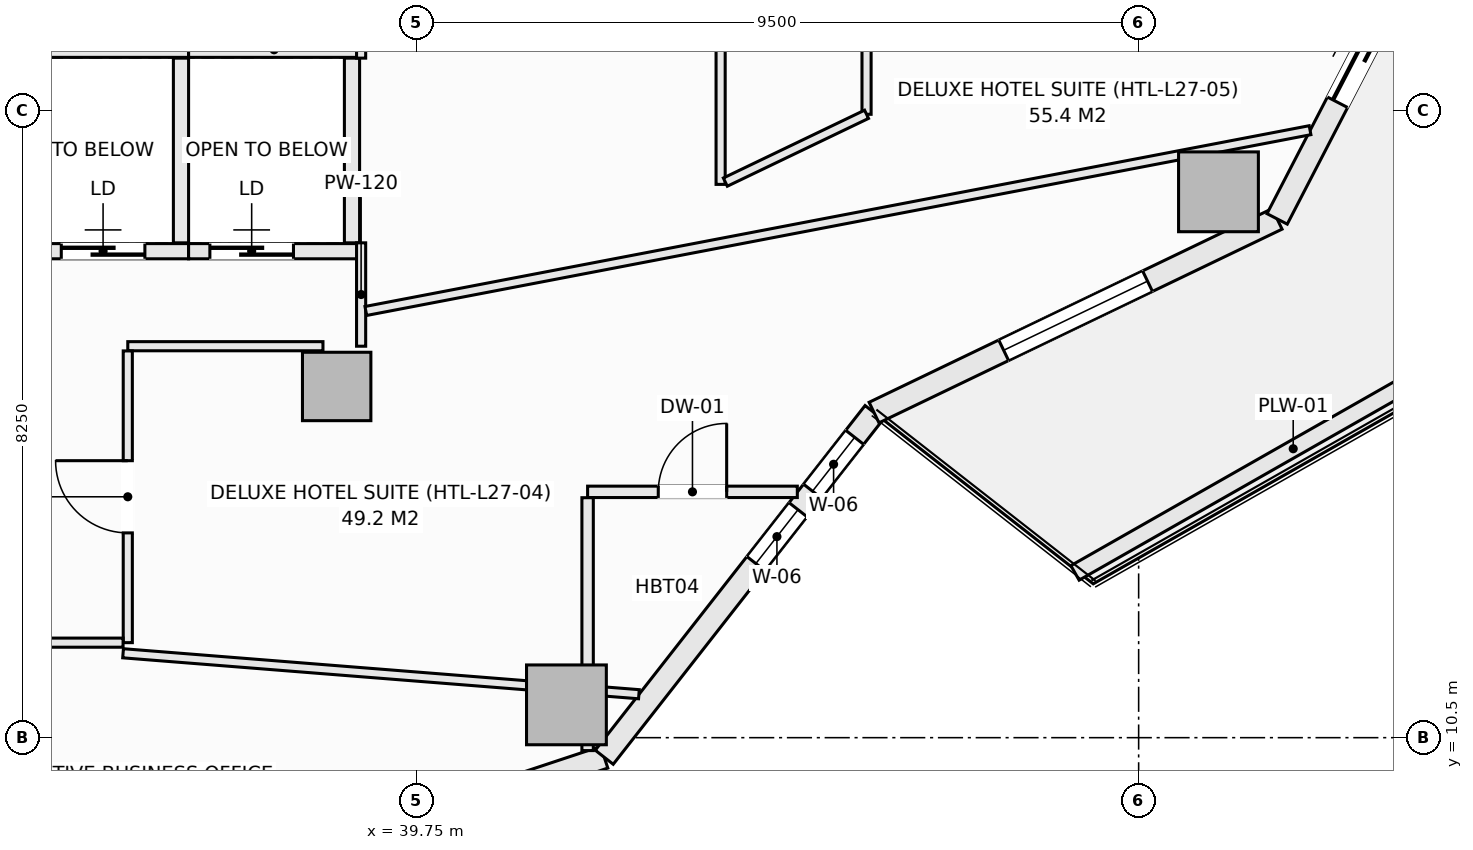
"""IFC4 building model, lengths in metres.
Left out: names, types, materials, properties, quantities, classifications, styles, units other than length and angle.
Written with IfcOpenShell. Run it as: python <this file> out.ifc"""

import sys

from ifc_helpers import new_model, si_unit, direction, frame, frame_2d, origin, origin_2d, place, context, subcontext, project, spatial, rectangle, extrude, element, fill, save


model = new_model("IFC4")
c1 = context("Model", 3, precision=1e-05, world=origin(), true_north=direction((0.0, 1.0)))
c2 = subcontext(c1, "Body", "Model", "MODEL_VIEW")
j1 = project(units=[si_unit("LENGTHUNIT", "METRE"), si_unit("PLANEANGLEUNIT", "RADIAN")], contexts=[c1])
p1 = place(None, origin())
s1 = spatial("IfcSite", under=j1, at=p1, CompositionType="ELEMENT")
p2 = place(p1, origin())
s2 = spatial("IfcBuilding", under=s1, at=p2, CompositionType="ELEMENT")
p3 = place(p2, frame((0.0, 0.0, 112.1)))
s3 = spatial("IfcBuildingStorey", under=s2, at=p3, CompositionType="ELEMENT", Elevation=112.1)
for number, where, z_axis, x_axis in (
    (1, (41.721, 10.932, -0.27), (0.0, 0.0, 1.0), (1.0, 0.0, 0.0)),
    (2, (50.3, 17.681, -0.27), (0.0, 0.0, 1.0), (1.0, 0.0, 0.0)),
):
    element("IfcColumn", number, at=place(p3, frame(where, z_axis=z_axis, x_axis=x_axis)), inside=s3, PredefinedType="COLUMN", context=c2, shape_type="SweptSolid", body=[
        extrude(rectangle(XDim=1.05, YDim=1.05, at=origin_2d()), origin(), (0.0, 0.0, 1.0), 3.4),
    ])
p4 = place(p3, frame((38.698, 15.121, -0.27), z_axis=(0.0, 0.0, 1.0), x_axis=(1.0, 0.0, 0.0)))
e3 = element("IfcColumn", 3, at=p4, inside=s3, PredefinedType="COLUMN", context=c2, shape_type="SweptSolid", body=[
    extrude(rectangle(XDim=0.9, YDim=0.9, at=origin_2d()), origin(), (0.0, 0.0, 1.0), 3.4),
])
p5 = place(p3, frame((36.385, 8.309, 0.0), z_axis=(0.0, 0.0, 1.0), x_axis=(0.949238009374, 0.314558741032, 0.0)))
e4 = element("IfcWall", 4, at=p5, inside=s3, PredefinedType="SOLIDWALL", context=c2, shape_type="SweptSolid", body=[
    extrude(rectangle(XDim=6.146, YDim=0.3, at=frame_2d((3.073, 0.0))), origin(), (0.0, 0.0, 1.0), 2.653),
])
p6 = place(p5, frame((2.023, 0.0, 0.74)))
e5 = element("IfcOpeningElement", 5, at=p6, cuts=e4, PredefinedType="OPENING", context=c2, shape_type="SweptSolid", body=[
    extrude(rectangle(XDim=2.1, YDim=1.7, at=frame_2d((1.05, 0.85))), frame((0.0, 0.16, 0.0), z_axis=(0.0, -1.0, 0.0), x_axis=(1.0, 0.0, 0.0)), (0.0, 0.0, 1.0), 0.32),
])
p7 = place(p3, frame((42.219, 10.242, 0.0), z_axis=(0.0, 0.0, 1.0), x_axis=(0.616435134162, 0.787405693001, 0.0)))
e6 = element("IfcWall", 6, at=p7, inside=s3, PredefinedType="SOLIDWALL", context=c2, shape_type="SweptSolid", body=[
    extrude(rectangle(XDim=5.759, YDim=0.3, at=frame_2d((2.879, 0.0))), origin(), (0.0, 0.0, 1.0), 2.653),
])
p8 = place(p7, frame((3.236, 0.0, 0.74)))
e7 = element("IfcOpeningElement", 7, at=p8, cuts=e6, PredefinedType="OPENING", context=c2, shape_type="SweptSolid", body=[
    extrude(rectangle(XDim=0.9, YDim=1.7, at=frame_2d((0.45, 0.85))), frame((0.0, 0.16, 0.0), z_axis=(0.0, -1.0, 0.0), x_axis=(1.0, 0.0, 0.0)), (0.0, 0.0, 1.0), 0.32),
])
p9 = place(p7, frame((4.445, 0.0, 0.74)))
e8 = element("IfcOpeningElement", 8, at=p9, cuts=e6, PredefinedType="OPENING", context=c2, shape_type="SweptSolid", body=[
    extrude(rectangle(XDim=0.9, YDim=1.7, at=frame_2d((0.45, 0.85))), frame((0.0, 0.16, 0.0), z_axis=(0.0, -1.0, 0.0), x_axis=(1.0, 0.0, 0.0)), (0.0, 0.0, 1.0), 0.32),
])
p10 = place(p3, frame((45.769, 14.777, 0.0), z_axis=(0.0, 0.0, 1.0), x_axis=(0.901370184739, 0.433049408339, 0.0)))
e9 = element("IfcWall", 9, at=p10, inside=s3, PredefinedType="SOLIDWALL", context=c2, shape_type="SweptSolid", body=[
    extrude(rectangle(XDim=5.884, YDim=0.3, at=frame_2d((2.942, 0.0))), origin(), (0.0, 0.0, 1.0), 2.653),
])
p11 = place(p10, frame((1.892, 0.0, 0.74)))
e10 = element("IfcOpeningElement", 10, at=p11, cuts=e9, PredefinedType="OPENING", context=c2, shape_type="SweptSolid", body=[
    extrude(rectangle(XDim=2.1, YDim=1.7, at=frame_2d((1.05, 0.85))), frame((0.0, 0.16, 0.0), z_axis=(0.0, -1.0, 0.0), x_axis=(1.0, 0.0, 0.0)), (0.0, 0.0, 1.0), 0.32),
])
p12 = place(p3, frame((51.072, 17.325, 0.0), z_axis=(0.0, 0.0, 1.0), x_axis=(0.459767899643, 0.888039119892, 0.0)))
e11 = element("IfcWall", 11, at=p12, inside=s3, PredefinedType="SOLIDWALL", context=c2, shape_type="SweptSolid", body=[
    extrude(rectangle(XDim=5.255, YDim=0.3, at=frame_2d((2.628, 0.0))), origin(), (0.0, 0.0, 1.0), 2.653),
])
p13 = place(p12, frame((1.728, 0.0, 0.0)))
e12 = element("IfcOpeningElement", 12, at=p13, cuts=e11, PredefinedType="OPENING", context=c2, shape_type="SweptSolid", body=[
    extrude(rectangle(XDim=1.8, YDim=2.25, at=frame_2d((0.9, 1.125))), frame((0.0, 0.16, 0.0), z_axis=(0.0, -1.0, 0.0), x_axis=(1.0, 0.0, 0.0)), (0.0, 0.0, 1.0), 0.32),
])
p14 = place(p3, frame((48.413, 12.668, 0.0), z_axis=(0.0, 0.0, 1.0), x_axis=(0.869187658335, 0.494482370361, 0.0)))
e13 = element("IfcWall", 13, at=p14, inside=s3, PredefinedType="PARAPET", context=c2, shape_type="SweptSolid", body=[
    extrude(rectangle(XDim=6.606, YDim=0.22, at=frame_2d((3.303, 0.0))), origin(), (0.0, 0.0, 1.0), 0.52),
])
p15 = place(p3, frame((34.5, 19.55, 0.0), z_axis=(0.0, 0.0, 1.0), x_axis=(1.0, 0.0, 0.0)))
e14 = element("IfcWall", 14, at=p15, inside=s3, PredefinedType="SOLIDWALL", context=c2, shape_type="SweptSolid", body=[
    extrude(rectangle(XDim=2.25, YDim=0.2, at=frame_2d((1.125, 0.0))), origin(), (0.0, 0.0, 1.0), 3.13),
])
p16 = place(p3, frame((34.5, 16.9, 0.0), z_axis=(0.0, 0.0, 1.0), x_axis=(1.0, 0.0, 0.0)))
e15 = element("IfcWall", 15, at=p16, inside=s3, PredefinedType="SOLIDWALL", context=c2, shape_type="SweptSolid", body=[
    extrude(rectangle(XDim=2.25, YDim=0.2, at=frame_2d((1.125, 0.0))), origin(), (0.0, 0.0, 1.0), 3.13),
])
p17 = place(p16, frame((0.575, 0.0, 0.0)))
e16 = element("IfcOpeningElement", 16, at=p17, cuts=e15, PredefinedType="OPENING", context=c2, shape_type="SweptSolid", body=[
    extrude(rectangle(XDim=1.1, YDim=2.2, at=frame_2d((0.55, 1.1))), frame((0.0, 0.11, 0.0), z_axis=(0.0, -1.0, 0.0), x_axis=(1.0, 0.0, 0.0)), (0.0, 0.0, 1.0), 0.22),
])
p18 = place(p3, frame((36.65, 17.01, 0.0), z_axis=(0.0, 0.0, 1.0), x_axis=(0.0, 1.0, 0.0)))
e17 = element("IfcWall", 17, at=p18, inside=s3, PredefinedType="SOLIDWALL", context=c2, shape_type="SweptSolid", body=[
    extrude(rectangle(XDim=2.43, YDim=0.2, at=frame_2d((1.215, 0.0))), origin(), (0.0, 0.0, 1.0), 3.13),
])
p19 = place(p3, frame((36.75, 19.55, 0.0), z_axis=(0.0, 0.0, 1.0), x_axis=(1.0, 0.0, 0.0)))
e18 = element("IfcWall", 18, at=p19, inside=s3, PredefinedType="SOLIDWALL", context=c2, shape_type="SweptSolid", body=[
    extrude(rectangle(XDim=2.25, YDim=0.2, at=frame_2d((1.125, 0.0))), origin(), (0.0, 0.0, 1.0), 3.13),
])
p20 = place(p3, frame((36.75, 16.9, 0.0), z_axis=(0.0, 0.0, 1.0), x_axis=(1.0, 0.0, 0.0)))
e19 = element("IfcWall", 19, at=p20, inside=s3, PredefinedType="SOLIDWALL", context=c2, shape_type="SweptSolid", body=[
    extrude(rectangle(XDim=2.25, YDim=0.2, at=frame_2d((1.125, 0.0))), origin(), (0.0, 0.0, 1.0), 3.13),
])
p21 = place(p20, frame((0.28, 0.0, 0.0)))
e20 = element("IfcOpeningElement", 20, at=p21, cuts=e19, PredefinedType="OPENING", context=c2, shape_type="SweptSolid", body=[
    extrude(rectangle(XDim=1.1, YDim=2.2, at=frame_2d((0.55, 1.1))), frame((0.0, 0.11, 0.0), z_axis=(0.0, -1.0, 0.0), x_axis=(1.0, 0.0, 0.0)), (0.0, 0.0, 1.0), 0.22),
])
p22 = place(p3, frame((38.9, 17.01, 0.0), z_axis=(0.0, 0.0, 1.0), x_axis=(0.0, 1.0, 0.0)))
e21 = element("IfcWall", 21, at=p22, inside=s3, PredefinedType="SOLIDWALL", context=c2, shape_type="SweptSolid", body=[
    extrude(rectangle(XDim=2.43, YDim=0.2, at=frame_2d((1.215, 0.0))), origin(), (0.0, 0.0, 1.0), 3.13),
])
p23 = place(p3, frame((39.02, 15.65, 0.0), z_axis=(0.0, 0.0, 1.0), x_axis=(0.0, 1.0, 0.0)))
e22 = element("IfcWall", 22, at=p23, inside=s3, PredefinedType="PARTITIONING", context=c2, shape_type="SweptSolid", body=[
    extrude(rectangle(XDim=1.36, YDim=0.12, at=frame_2d((0.68, 0.0))), origin(), (0.0, 0.0, 1.0), 2.505),
])
p24 = place(p3, frame((39.02, 19.44, 0.0), z_axis=(0.0, 0.0, 1.0), x_axis=(0.0, 1.0, 0.0)))
e23 = element("IfcWall", 23, at=p24, inside=s3, PredefinedType="PARTITIONING", context=c2, shape_type="SweptSolid", body=[
    extrude(rectangle(XDim=0.92, YDim=0.12, at=frame_2d((0.46, 0.0))), origin(), (0.0, 0.0, 1.0), 3.13),
])
p25 = place(p3, frame((35.95, 15.65, 0.0), z_axis=(0.0, 0.0, 1.0), x_axis=(1.0, 0.0, 0.0)))
e24 = element("IfcWall", 24, at=p25, inside=s3, PredefinedType="PARTITIONING", context=c2, shape_type="SweptSolid", body=[
    extrude(rectangle(XDim=2.568, YDim=0.12, at=frame_2d((1.284, 0.0))), origin(), (0.0, 0.0, 1.0), 3.13),
])
p26 = place(p3, frame((35.95, 11.75, 0.0), z_axis=(0.0, 0.0, 1.0), x_axis=(0.0, 1.0, 0.0)))
e25 = element("IfcWall", 25, at=p26, inside=s3, PredefinedType="PARTITIONING", context=c2, shape_type="SweptSolid", body=[
    extrude(rectangle(XDim=3.838, YDim=0.12, at=frame_2d((1.919, 0.0))), origin(), (0.0, 0.0, 1.0), 3.13),
])
p27 = place(p26, frame((1.444, 0.0, 0.0)))
e26 = element("IfcOpeningElement", 26, at=p27, cuts=e25, PredefinedType="OPENING", context=c2, shape_type="SweptSolid", body=[
    extrude(rectangle(XDim=0.95, YDim=2.1, at=frame_2d((0.475, 1.05))), frame((0.0, 0.07, 0.0), z_axis=(0.0, -1.0, 0.0), x_axis=(1.0, 0.0, 0.0)), (0.0, 0.0, 1.0), 0.14),
])
p28 = place(p3, frame((27.242, 11.75, 0.0), z_axis=(0.0, 0.0, 1.0), x_axis=(1.0, 0.0, 0.0)))
e27 = element("IfcWall", 27, at=p28, inside=s3, PredefinedType="PARTITIONING", context=c2, shape_type="SweptSolid", body=[
    extrude(rectangle(XDim=8.646, YDim=0.12, at=frame_2d((4.323, 0.0))), origin(), (0.0, 0.0, 1.0), 3.13),
])
p29 = place(p28, frame((1.586, 0.0, 0.0)))
e28 = element("IfcOpeningElement", 28, at=p29, cuts=e27, PredefinedType="OPENING", context=c2, shape_type="SweptSolid", body=[
    extrude(rectangle(XDim=0.95, YDim=2.1, at=frame_2d((0.475, 1.05))), frame((0.0, 0.07, 0.0), z_axis=(0.0, -1.0, 0.0), x_axis=(1.0, 0.0, 0.0)), (0.0, 0.0, 1.0), 0.14),
])
p30 = place(p28, frame((5.485, 0.0, 0.0)))
e29 = element("IfcOpeningElement", 29, at=p30, cuts=e27, PredefinedType="OPENING", context=c2, shape_type="SweptSolid", body=[
    extrude(rectangle(XDim=0.95, YDim=2.1, at=frame_2d((0.475, 1.05))), frame((0.0, 0.07, 0.0), z_axis=(0.0, -1.0, 0.0), x_axis=(1.0, 0.0, 0.0)), (0.0, 0.0, 1.0), 0.14),
])
p31 = place(p3, frame((43.75, 17.779, 0.0), z_axis=(0.0, 0.0, 1.0), x_axis=(0.0, 1.0, 0.0)))
e30 = element("IfcWall", 30, at=p31, inside=s3, PredefinedType="PARTITIONING", context=c2, shape_type="SweptSolid", body=[
    extrude(rectangle(XDim=5.241, YDim=0.12, at=frame_2d((2.621, 0.0))), origin(), (0.0, 0.0, 1.0), 3.13),
])
p32 = place(p31, frame((2.146, 0.0, 0.0)))
e31 = element("IfcOpeningElement", 31, at=p32, cuts=e30, PredefinedType="OPENING", context=c2, shape_type="SweptSolid", body=[
    extrude(rectangle(XDim=0.95, YDim=2.1, at=frame_2d((0.475, 1.05))), frame((0.0, 0.07, 0.0), z_axis=(0.0, -1.0, 0.0), x_axis=(1.0, 0.0, 0.0)), (0.0, 0.0, 1.0), 0.14),
])
p33 = place(p3, frame((45.67, 18.701, 0.0), z_axis=(0.0, 0.0, 1.0), x_axis=(0.0, 1.0, 0.0)))
e32 = element("IfcWall", 32, at=p33, inside=s3, PredefinedType="PARTITIONING", context=c2, shape_type="SweptSolid", body=[
    extrude(rectangle(XDim=8.747, YDim=0.12, at=frame_2d((4.374, 0.0))), origin(), (0.0, 0.0, 1.0), 3.13),
])
p34 = place(p3, frame((43.812, 17.809, 0.0), z_axis=(0.0, 0.0, 1.0), x_axis=(0.901467594949, 0.432846595525, 0.0)))
e33 = element("IfcWall", 33, at=p34, inside=s3, PredefinedType="PARTITIONING", context=c2, shape_type="SweptSolid", body=[
    extrude(rectangle(XDim=2.061, YDim=0.12, at=frame_2d((1.031, 0.0))), origin(), (0.0, 0.0, 1.0), 3.13),
])
p35 = place(p3, frame((39.082, 16.114, 0.0), z_axis=(0.0, 0.0, 1.0), x_axis=(0.982162094293, 0.188036221334, 0.0)))
e34 = element("IfcWall", 34, at=p35, inside=s3, PredefinedType="PARTITIONING", context=c2, shape_type="SweptSolid", body=[
    extrude(rectangle(XDim=12.649, YDim=0.12, at=frame_2d((6.324, 0.0))), origin(), (0.0, 0.0, 1.0), 2.812),
])
p36 = place(p3, frame((35.888, 11.61, 0.0), z_axis=(0.0, 0.0, 1.0), x_axis=(0.996863327207, -0.079142320341, 0.0)))
e35 = element("IfcWall", 35, at=p36, inside=s3, PredefinedType="PARTITIONING", context=c2, shape_type="SweptSolid", body=[
    extrude(rectangle(XDim=6.808, YDim=0.12, at=frame_2d((3.404, 0.0))), origin(), (0.0, 0.0, 1.0), 3.13),
])
p37 = place(p3, frame((42.0, 13.734, 0.0), z_axis=(0.0, 0.0, 1.0), x_axis=(1.0, 0.0, 0.0)))
e36 = element("IfcWall", 36, at=p37, inside=s3, PredefinedType="PARTITIONING", context=c2, shape_type="SweptSolid", body=[
    extrude(rectangle(XDim=2.759, YDim=0.15, at=frame_2d((1.38, 0.0))), origin(), (0.0, 0.0, 1.0), 3.13),
])
p38 = place(p37, frame((0.93, 0.0, 0.0)))
e37 = element("IfcOpeningElement", 37, at=p38, cuts=e36, PredefinedType="OPENING", context=c2, shape_type="SweptSolid", body=[
    extrude(rectangle(XDim=0.9, YDim=2.1, at=frame_2d((0.45, 1.05))), frame((0.0, 0.085, 0.0), z_axis=(0.0, -1.0, 0.0), x_axis=(1.0, 0.0, 0.0)), (0.0, 0.0, 1.0), 0.17),
])
p39 = place(p3, frame((42.0, 10.33, 0.0), z_axis=(0.0, 0.0, 1.0), x_axis=(0.0, 1.0, 0.0)))
e38 = element("IfcWall", 38, at=p39, inside=s3, PredefinedType="PARTITIONING", context=c2, shape_type="SweptSolid", body=[
    extrude(rectangle(XDim=0.733, YDim=0.15, at=frame_2d((0.366, 0.0))), origin(), (0.0, 0.0, 1.0), 3.13),
])
p40 = place(p3, frame((42.0, 11.188, 0.0), z_axis=(0.0, 0.0, 1.0), x_axis=(0.0, 1.0, 0.0)))
e39 = element("IfcWall", 39, at=p40, inside=s3, PredefinedType="PARTITIONING", context=c2, shape_type="SweptSolid", body=[
    extrude(rectangle(XDim=2.469, YDim=0.15, at=frame_2d((1.235, 0.0))), origin(), (0.0, 0.0, 1.0), 3.13),
])
p41 = place(p8, origin())
e40 = element("IfcWindow", 40, at=p41, inside=s3, PartitioningType="SINGLE_PANEL", PredefinedType="WINDOW", context=c2, shape_type="SweptSolid", body=[
    extrude(rectangle(XDim=0.9, YDim=1.7, at=frame_2d((0.45, 0.85))), frame((0.0, 0.03, 0.0), z_axis=(0.0, -1.0, 0.0), x_axis=(1.0, 0.0, 0.0)), (0.0, 0.0, 1.0), 0.06),
])
fill(e7, e40)
p42 = place(p11, origin())
e41 = element("IfcWindow", 41, at=p42, inside=s3, PartitioningType="SINGLE_PANEL", PredefinedType="WINDOW", context=c2, shape_type="SweptSolid", body=[
    extrude(rectangle(XDim=2.1, YDim=1.7, at=frame_2d((1.05, 0.85))), frame((0.0, 0.03, 0.0), z_axis=(0.0, -1.0, 0.0), x_axis=(1.0, 0.0, 0.0)), (0.0, 0.0, 1.0), 0.06),
])
fill(e10, e41)
p43 = place(p13, frame((1.8, 0.0, 0.0), z_axis=(0.0, 0.0, 1.0), x_axis=(-1.0, 0.0, 0.0)))
e42 = element("IfcDoor", 42, at=p43, inside=s3, OperationType="SLIDING_TO_LEFT", PredefinedType="DOOR", context=c2, shape_type="SweptSolid", body=[
    extrude(rectangle(XDim=1.8, YDim=2.25, at=frame_2d((0.9, 1.125))), frame((0.0, 0.025, 0.0), z_axis=(0.0, -1.0, 0.0), x_axis=(1.0, 0.0, 0.0)), (0.0, 0.0, 1.0), 0.05),
])
fill(e12, e42)
p44 = place(p17, origin())
e43 = element("IfcDoor", 43, at=p44, inside=s3, OperationType="SLIDING_TO_LEFT", PredefinedType="DOOR", context=c2, shape_type="SweptSolid", body=[
    extrude(rectangle(XDim=1.1, YDim=2.2, at=frame_2d((0.55, 1.1))), frame((0.0, 0.025, 0.0), z_axis=(0.0, -1.0, 0.0), x_axis=(1.0, 0.0, 0.0)), (0.0, 0.0, 1.0), 0.05),
])
fill(e16, e43)
p45 = place(p21, origin())
e44 = element("IfcDoor", 44, at=p45, inside=s3, OperationType="SLIDING_TO_LEFT", PredefinedType="DOOR", context=c2, shape_type="SweptSolid", body=[
    extrude(rectangle(XDim=1.1, YDim=2.2, at=frame_2d((0.55, 1.1))), frame((0.0, 0.025, 0.0), z_axis=(0.0, -1.0, 0.0), x_axis=(1.0, 0.0, 0.0)), (0.0, 0.0, 1.0), 0.05),
])
fill(e20, e44)
p46 = place(p27, origin())
e45 = element("IfcDoor", 45, at=p46, inside=s3, OperationType="SINGLE_SWING_RIGHT", PredefinedType="DOOR", context=c2, shape_type="SweptSolid", body=[
    extrude(rectangle(XDim=0.95, YDim=2.1, at=frame_2d((0.475, 1.05))), frame((0.0, 0.025, 0.0), z_axis=(0.0, -1.0, 0.0), x_axis=(1.0, 0.0, 0.0)), (0.0, 0.0, 1.0), 0.05),
])
fill(e26, e45)
p47 = place(p38, origin())
e46 = element("IfcDoor", 46, at=p47, inside=s3, OperationType="SINGLE_SWING_RIGHT", PredefinedType="DOOR", context=c2, shape_type="SweptSolid", body=[
    extrude(rectangle(XDim=0.9, YDim=2.1, at=frame_2d((0.45, 1.05))), frame((0.0, 0.025, 0.0), z_axis=(0.0, -1.0, 0.0), x_axis=(1.0, 0.0, 0.0)), (0.0, 0.0, 1.0), 0.05),
])
fill(e37, e46)
p48 = place(p9, origin())
e47 = element("IfcWindow", 47, at=p48, inside=s3, PartitioningType="SINGLE_PANEL", PredefinedType="WINDOW", context=c2, shape_type="SweptSolid", body=[
    extrude(rectangle(XDim=0.9, YDim=1.7, at=frame_2d((0.45, 0.85))), frame((0.0, 0.03, 0.0), z_axis=(0.0, -1.0, 0.0), x_axis=(1.0, 0.0, 0.0)), (0.0, 0.0, 1.0), 0.06),
])
fill(e8, e47)
save(model, sys.argv[1])
